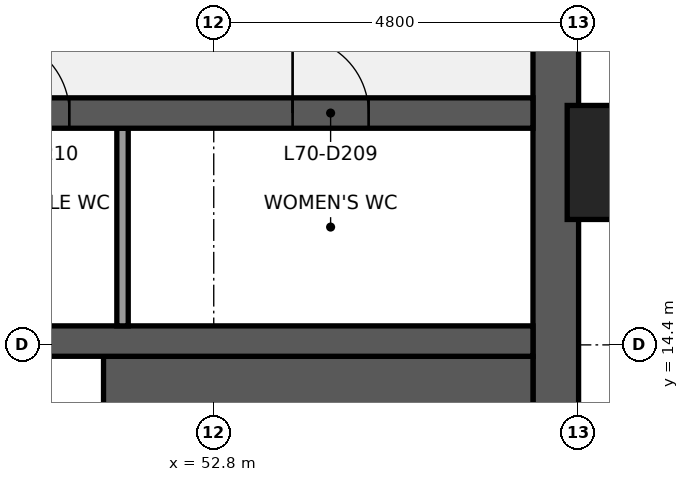
"""IFC4 building model, lengths in metres.
Left out: names, types, materials, properties, quantities, classifications, styles, units other than length and angle.
Written with IfcOpenShell. Run it as: python <this file> out.ifc"""

import sys

from ifc_helpers import new_model, si_unit, direction, frame, frame_2d, origin, origin_2d, place, context, subcontext, project, spatial, rectangle, extrude, element, fill, save


model = new_model("IFC4")
c1 = context("Model", 3, precision=1e-05, world=origin(), true_north=direction((0.0, 1.0)))
c2 = subcontext(c1, "Body", "Model", "MODEL_VIEW")
j1 = project(units=[si_unit("LENGTHUNIT", "METRE"), si_unit("PLANEANGLEUNIT", "RADIAN")], contexts=[c1])
p1 = place(None, origin())
s1 = spatial("IfcSite", under=j1, at=p1, CompositionType="ELEMENT")
p2 = place(p1, origin())
s2 = spatial("IfcBuilding", under=s1, at=p2, CompositionType="ELEMENT")
p3 = place(p2, frame((0.0, 0.0, 318.3)))
s3 = spatial("IfcBuildingStorey", under=s2, at=p3, CompositionType="ELEMENT", Elevation=318.3)
p4 = place(p3, frame((57.3, 38.4, 0.0), z_axis=(0.0, 0.0, 1.0), x_axis=(0.0, -1.0, 0.0)))
e1 = element("IfcWall", 1, at=p4, inside=s3, PredefinedType="SHEAR", context=c2, shape_type="SweptSolid", body=[
    extrude(rectangle(XDim=28.8, YDim=0.6, at=frame_2d((14.4, 0.0))), origin(), (0.0, 0.0, 1.0), 3.84),
])
p5 = place(p4, frame((18.45, 0.0, 0.9)))
e2 = element("IfcOpeningElement", 2, at=p5, cuts=e1, PredefinedType="OPENING", context=c2, shape_type="SweptSolid", body=[
    extrude(rectangle(XDim=1.5, YDim=1.5, at=frame_2d((0.75, 0.75))), frame((0.0, 0.31, 0.0), z_axis=(0.0, -1.0, 0.0), x_axis=(1.0, 0.0, 0.0)), (0.0, 0.0, 1.0), 0.62),
])
p6 = place(p4, frame((8.85, 0.0, 0.9)))
e3 = element("IfcOpeningElement", 3, at=p6, cuts=e1, PredefinedType="OPENING", context=c2, shape_type="SweptSolid", body=[
    extrude(rectangle(XDim=1.5, YDim=1.5, at=frame_2d((0.75, 0.75))), frame((0.0, 0.31, 0.0), z_axis=(0.0, -1.0, 0.0), x_axis=(1.0, 0.0, 0.0)), (0.0, 0.0, 1.0), 0.62),
])
p7 = place(p3, frame((51.35, 12.225, 0.0), z_axis=(0.0, 0.0, 1.0), x_axis=(1.0, 0.0, 0.0)))
e4 = element("IfcWall", 4, at=p7, inside=s3, PredefinedType="SHEAR", context=c2, shape_type="SweptSolid", body=[
    extrude(rectangle(XDim=5.65, YDim=4.05, at=frame_2d((2.825, 0.0))), origin(), (0.0, 0.0, 1.0), 3.84),
])
p8 = place(p3, frame((39.0, 14.45, 0.0), z_axis=(0.0, 0.0, 1.0), x_axis=(1.0, 0.0, 0.0)))
e5 = element("IfcWall", 5, at=p8, inside=s3, PredefinedType="SHEAR", context=c2, shape_type="SweptSolid", body=[
    extrude(rectangle(XDim=18.0, YDim=0.4, at=frame_2d((9.0, 0.0))), origin(), (0.0, 0.0, 1.0), 3.84),
])
p9 = place(p3, frame((51.6, 14.65, 0.0), z_axis=(0.0, 0.0, 1.0), x_axis=(0.0, 1.0, 0.0)))
e6 = element("IfcWall", 6, at=p9, inside=s3, PredefinedType="PARTITIONING", context=c2, shape_type="SweptSolid", body=[
    extrude(rectangle(XDim=2.6, YDim=0.15, at=frame_2d((1.3, 0.0))), origin(), (0.0, 0.0, 1.0), 3.84),
])
p10 = place(p3, frame((39.0, 17.45, 0.0), z_axis=(0.0, 0.0, 1.0), x_axis=(1.0, 0.0, 0.0)))
e7 = element("IfcWall", 7, at=p10, inside=s3, PredefinedType="SHEAR", context=c2, shape_type="SweptSolid", body=[
    extrude(rectangle(XDim=18.0, YDim=0.4, at=frame_2d((9.0, 0.0))), origin(), (0.0, 0.0, 1.0), 3.84),
])
p11 = place(p10, frame((14.837, 0.0, 0.0)))
e8 = element("IfcOpeningElement", 8, at=p11, cuts=e7, PredefinedType="OPENING", context=c2, shape_type="SweptSolid", body=[
    extrude(rectangle(XDim=1.0, YDim=2.1, at=frame_2d((0.5, 1.05))), frame((0.0, 0.21, 0.0), z_axis=(0.0, -1.0, 0.0), x_axis=(1.0, 0.0, 0.0)), (0.0, 0.0, 1.0), 0.42),
])
p12 = place(p10, frame((10.9, 0.0, 0.0)))
e9 = element("IfcOpeningElement", 9, at=p12, cuts=e7, PredefinedType="OPENING", context=c2, shape_type="SweptSolid", body=[
    extrude(rectangle(XDim=1.0, YDim=2.1, at=frame_2d((0.5, 1.05))), frame((0.0, 0.21, 0.0), z_axis=(0.0, -1.0, 0.0), x_axis=(1.0, 0.0, 0.0)), (0.0, 0.0, 1.0), 0.42),
])
p13 = place(p10, frame((8.5, 0.0, 0.0)))
e10 = element("IfcOpeningElement", 10, at=p13, cuts=e7, PredefinedType="OPENING", context=c2, shape_type="SweptSolid", body=[
    extrude(rectangle(XDim=1.0, YDim=2.1, at=frame_2d((0.5, 1.05))), frame((0.0, 0.21, 0.0), z_axis=(0.0, -1.0, 0.0), x_axis=(1.0, 0.0, 0.0)), (0.0, 0.0, 1.0), 0.42),
])
p14 = place(p10, frame((3.363, 0.0, 0.0)))
e11 = element("IfcOpeningElement", 11, at=p14, cuts=e7, PredefinedType="OPENING", context=c2, shape_type="SweptSolid", body=[
    extrude(rectangle(XDim=1.0, YDim=2.1, at=frame_2d((0.5, 1.05))), frame((0.0, 0.21, 0.0), z_axis=(0.0, -1.0, 0.0), x_axis=(1.0, 0.0, 0.0)), (0.0, 0.0, 1.0), 0.42),
])
p15 = place(p3, frame((58.35, 16.8, 0.0), z_axis=(0.0, 0.0, 1.0), x_axis=(0.0, 1.0, 0.0)))
e12 = element("IfcColumn", 12, at=p15, inside=s3, PredefinedType="PILASTER", context=c2, shape_type="SweptSolid", body=[
    extrude(rectangle(XDim=1.8, YDim=1.5, at=origin_2d()), origin(), (0.0, 0.0, 1.0), 4.0),
])
p16 = place(p11, origin())
e13 = element("IfcDoor", 13, at=p16, inside=s3, OperationType="SINGLE_SWING_LEFT", PredefinedType="DOOR", context=c2, shape_type="SweptSolid", body=[
    extrude(rectangle(XDim=1.0, YDim=2.1, at=frame_2d((0.5, 1.05))), frame((0.0, 0.025, 0.0), z_axis=(0.0, -1.0, 0.0), x_axis=(1.0, 0.0, 0.0)), (0.0, 0.0, 1.0), 0.05),
])
fill(e8, e13)
p17 = place(p12, origin())
e14 = element("IfcDoor", 14, at=p17, inside=s3, OperationType="SINGLE_SWING_LEFT", PredefinedType="DOOR", context=c2, shape_type="SweptSolid", body=[
    extrude(rectangle(XDim=1.0, YDim=2.1, at=frame_2d((0.5, 1.05))), frame((0.0, 0.025, 0.0), z_axis=(0.0, -1.0, 0.0), x_axis=(1.0, 0.0, 0.0)), (0.0, 0.0, 1.0), 0.05),
])
fill(e9, e14)
save(model, sys.argv[1])
